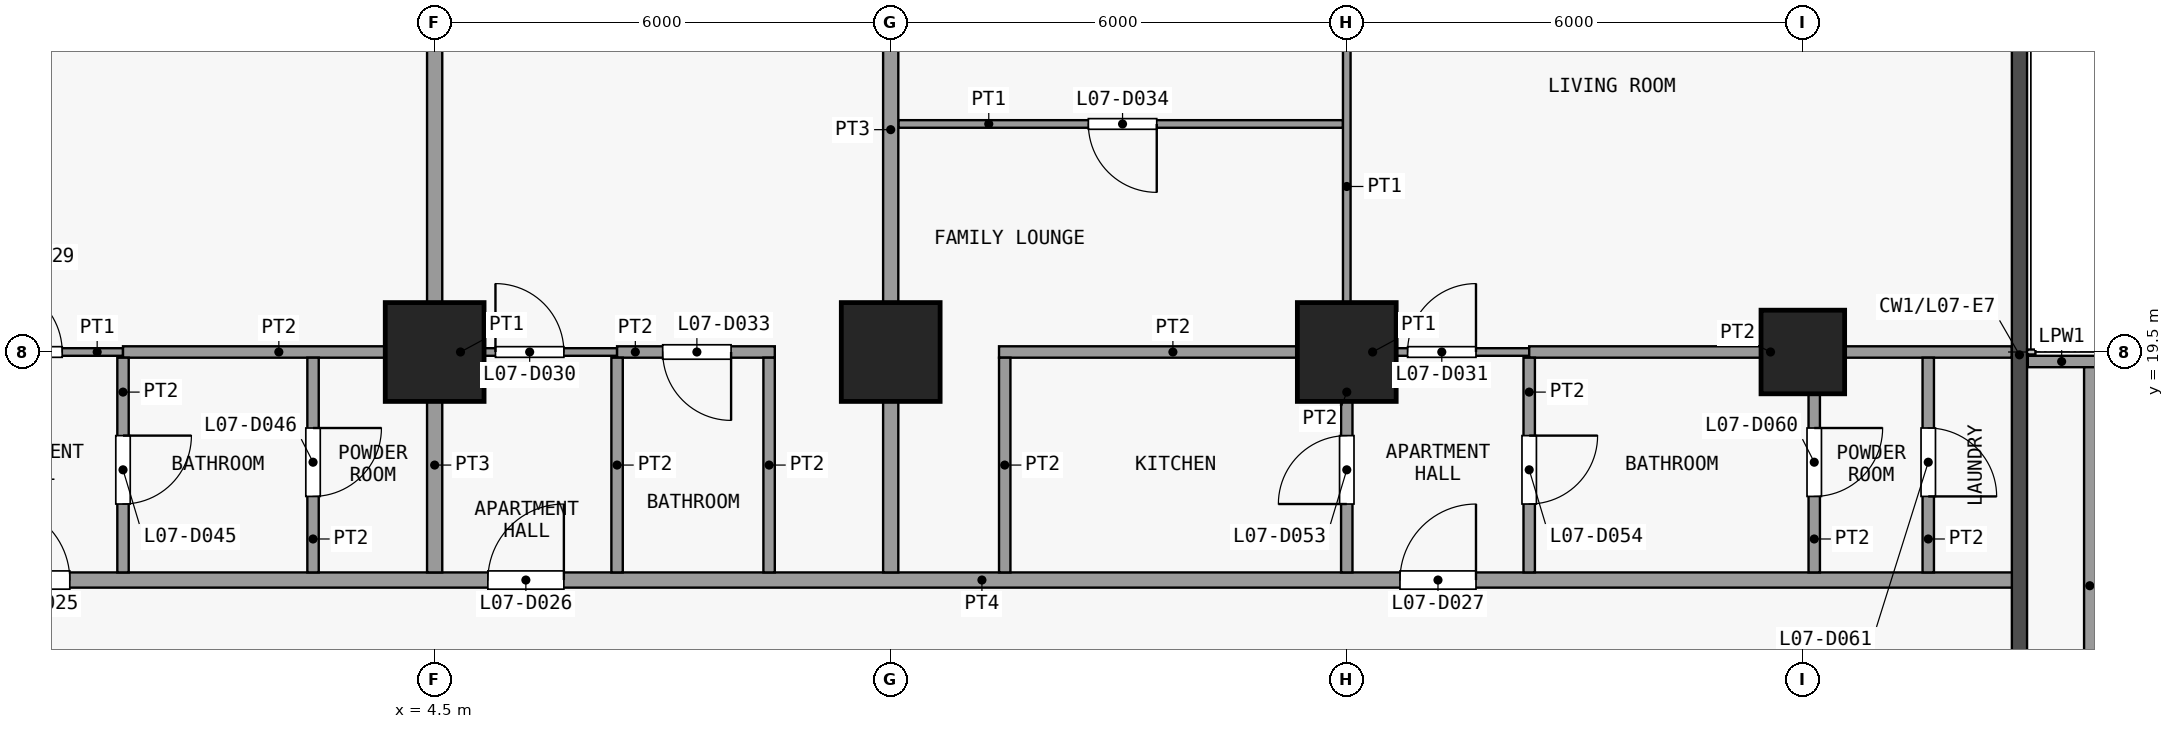
"""IFC4 building model, lengths in metres.
Left out: names, types, materials, properties, quantities, classifications, styles, units other than length and angle.
Written with IfcOpenShell. Run it as: python <this file> out.ifc"""

import sys

from ifc_helpers import new_model, si_unit, direction, frame, frame_2d, origin, origin_2d, place, context, subcontext, project, spatial, rectangle, extrude, element, fill, save


model = new_model("IFC4")
c1 = context("Model", 3, precision=1e-05, world=origin(), true_north=direction((0.0, 1.0)))
c2 = subcontext(c1, "Body", "Model", "MODEL_VIEW")
j1 = project(units=[si_unit("LENGTHUNIT", "METRE"), si_unit("PLANEANGLEUNIT", "RADIAN")], contexts=[c1])
p1 = place(None, origin())
s1 = spatial("IfcSite", under=j1, at=p1, CompositionType="ELEMENT")
p2 = place(p1, origin())
s2 = spatial("IfcBuilding", under=s1, at=p2, CompositionType="ELEMENT")
p3 = place(p2, frame((0.0, 0.0, 36.1)))
s3 = spatial("IfcBuildingStorey", under=s2, at=p3, CompositionType="ELEMENT", Elevation=36.1)
for number, where, z_axis, x_axis in (
    (1, (4.5, 19.5, 0.0), (0.0, 0.0, 1.0), (1.0, 0.0, 0.0)),
    (2, (10.5, 19.5, 0.0), (0.0, 0.0, 1.0), (1.0, 0.0, 0.0)),
    (3, (16.5, 19.5, 0.0), (0.0, 0.0, 1.0), (1.0, 0.0, 0.0)),
):
    element("IfcColumn", number, at=place(p3, frame(where, z_axis=z_axis, x_axis=x_axis)), inside=s3, PredefinedType="COLUMN", context=c2, shape_type="SweptSolid", body=[
        extrude(rectangle(XDim=1.3, YDim=1.3, at=origin_2d()), origin(), (0.0, 0.0, 1.0), 3.6),
    ])
p4 = place(p3, frame((22.5, 19.5, 0.0), z_axis=(0.0, 0.0, 1.0), x_axis=(1.0, 0.0, 0.0)))
e4 = element("IfcColumn", 4, at=p4, inside=s3, PredefinedType="COLUMN", context=c2, shape_type="SweptSolid", body=[
    extrude(rectangle(XDim=1.1, YDim=1.1, at=origin_2d()), origin(), (0.0, 0.0, 1.0), 3.6),
])
p5 = place(p3, frame((25.46, 19.375, 0.0), z_axis=(0.0, 0.0, 1.0), x_axis=(1.0, 0.0, 0.0)))
e5 = element("IfcWall", 5, at=p5, inside=s3, PredefinedType="PARAPET", context=c2, shape_type="SweptSolid", body=[
    extrude(rectangle(XDim=0.89, YDim=0.15, at=frame_2d((0.445, 0.0))), origin(), (0.0, 0.0, 1.0), 1.15),
])
p6 = place(p3, frame((26.275, 19.3, 0.0), z_axis=(0.0, 0.0, 1.0), x_axis=(0.0, -1.0, 0.0)))
e6 = element("IfcWall", 6, at=p6, inside=s3, PredefinedType="PARAPET", context=c2, shape_type="SweptSolid", body=[
    extrude(rectangle(XDim=5.75, YDim=0.15, at=frame_2d((2.875, 0.0))), origin(), (0.0, 0.0, 1.0), 1.15),
])
p7 = place(p3, frame((-26.25, 16.5, 0.0), z_axis=(0.0, 0.0, 1.0), x_axis=(1.0, 0.0, 0.0)))
e7 = element("IfcWall", 7, at=p7, inside=s3, PredefinedType="PARTITIONING", context=c2, shape_type="SweptSolid", body=[
    extrude(rectangle(XDim=51.6, YDim=0.2, at=frame_2d((25.8, 0.0))), origin(), (0.0, 0.0, 1.0), 3.3),
])
p8 = place(p7, frame((5.45, 0.0, 0.0)))
e8 = element("IfcOpeningElement", 8, at=p8, cuts=e7, PredefinedType="OPENING", context=c2, shape_type="SweptSolid", body=[
    extrude(rectangle(XDim=1.0, YDim=2.1, at=frame_2d((0.5, 1.05))), frame((0.0, 0.11, 0.0), z_axis=(0.0, -1.0, 0.0), x_axis=(1.0, 0.0, 0.0)), (0.0, 0.0, 1.0), 0.22),
])
p9 = place(p7, frame((12.25, 0.0, 0.0)))
e9 = element("IfcOpeningElement", 9, at=p9, cuts=e7, PredefinedType="OPENING", context=c2, shape_type="SweptSolid", body=[
    extrude(rectangle(XDim=0.9, YDim=2.1, at=frame_2d((0.45, 1.05))), frame((0.0, 0.11, 0.0), z_axis=(0.0, -1.0, 0.0), x_axis=(1.0, 0.0, 0.0)), (0.0, 0.0, 1.0), 0.22),
])
p10 = place(p7, frame((18.25, 0.0, 0.0)))
e10 = element("IfcOpeningElement", 10, at=p10, cuts=e7, PredefinedType="OPENING", context=c2, shape_type="SweptSolid", body=[
    extrude(rectangle(XDim=0.9, YDim=2.1, at=frame_2d((0.45, 1.05))), frame((0.0, 0.11, 0.0), z_axis=(0.0, -1.0, 0.0), x_axis=(1.0, 0.0, 0.0)), (0.0, 0.0, 1.0), 0.22),
])
p11 = place(p7, frame((24.95, 0.0, 0.0)))
e11 = element("IfcOpeningElement", 11, at=p11, cuts=e7, PredefinedType="OPENING", context=c2, shape_type="SweptSolid", body=[
    extrude(rectangle(XDim=1.0, YDim=2.1, at=frame_2d((0.5, 1.05))), frame((0.0, 0.11, 0.0), z_axis=(0.0, -1.0, 0.0), x_axis=(1.0, 0.0, 0.0)), (0.0, 0.0, 1.0), 0.22),
])
p12 = place(p7, frame((31.45, 0.0, 0.0)))
e12 = element("IfcOpeningElement", 12, at=p12, cuts=e7, PredefinedType="OPENING", context=c2, shape_type="SweptSolid", body=[
    extrude(rectangle(XDim=1.0, YDim=2.1, at=frame_2d((0.5, 1.05))), frame((0.0, 0.11, 0.0), z_axis=(0.0, -1.0, 0.0), x_axis=(1.0, 0.0, 0.0)), (0.0, 0.0, 1.0), 0.22),
])
p13 = place(p7, frame((43.45, 0.0, 0.0)))
e13 = element("IfcOpeningElement", 13, at=p13, cuts=e7, PredefinedType="OPENING", context=c2, shape_type="SweptSolid", body=[
    extrude(rectangle(XDim=1.0, YDim=2.1, at=frame_2d((0.5, 1.05))), frame((0.0, 0.11, 0.0), z_axis=(0.0, -1.0, 0.0), x_axis=(1.0, 0.0, 0.0)), (0.0, 0.0, 1.0), 0.22),
])
p14 = place(p3, frame((-2.0, 19.5, 0.0), z_axis=(0.0, 0.0, 1.0), x_axis=(1.0, 0.0, 0.0)))
e14 = element("IfcWall", 14, at=p14, inside=s3, PredefinedType="PARTITIONING", context=c2, shape_type="SweptSolid", body=[
    extrude(rectangle(XDim=2.4, YDim=0.1, at=frame_2d((1.2, 0.0))), origin(), (0.0, 0.0, 1.0), 3.3),
])
p15 = place(p14, frame((0.7, 0.0, 0.0)))
e15 = element("IfcOpeningElement", 15, at=p15, cuts=e14, PredefinedType="OPENING", context=c2, shape_type="SweptSolid", body=[
    extrude(rectangle(XDim=0.9, YDim=2.1, at=frame_2d((0.45, 1.05))), frame((0.0, 0.06, 0.0), z_axis=(0.0, -1.0, 0.0), x_axis=(1.0, 0.0, 0.0)), (0.0, 0.0, 1.0), 0.12),
])
p16 = place(p3, frame((4.5, 19.5, 0.0), z_axis=(0.0, 0.0, 1.0), x_axis=(1.0, 0.0, 0.0)))
e16 = element("IfcWall", 16, at=p16, inside=s3, PredefinedType="PARTITIONING", context=c2, shape_type="SweptSolid", body=[
    extrude(rectangle(XDim=2.4, YDim=0.1, at=frame_2d((1.2, 0.0))), origin(), (0.0, 0.0, 1.0), 3.3),
])
p17 = place(p16, frame((0.8, 0.0, 0.0)))
e17 = element("IfcOpeningElement", 17, at=p17, cuts=e16, PredefinedType="OPENING", context=c2, shape_type="SweptSolid", body=[
    extrude(rectangle(XDim=0.9, YDim=2.1, at=frame_2d((0.45, 1.05))), frame((0.0, 0.06, 0.0), z_axis=(0.0, -1.0, 0.0), x_axis=(1.0, 0.0, 0.0)), (0.0, 0.0, 1.0), 0.12),
])
p18 = place(p3, frame((16.5, 19.5, 0.0), z_axis=(0.0, 0.0, 1.0), x_axis=(1.0, 0.0, 0.0)))
e18 = element("IfcWall", 18, at=p18, inside=s3, PredefinedType="PARTITIONING", context=c2, shape_type="SweptSolid", body=[
    extrude(rectangle(XDim=2.4, YDim=0.1, at=frame_2d((1.2, 0.0))), origin(), (0.0, 0.0, 1.0), 3.3),
])
p19 = place(p18, frame((0.8, 0.0, 0.0)))
e19 = element("IfcOpeningElement", 19, at=p19, cuts=e18, PredefinedType="OPENING", context=c2, shape_type="SweptSolid", body=[
    extrude(rectangle(XDim=0.9, YDim=2.1, at=frame_2d((0.45, 1.05))), frame((0.0, 0.06, 0.0), z_axis=(0.0, -1.0, 0.0), x_axis=(1.0, 0.0, 0.0)), (0.0, 0.0, 1.0), 0.12),
])
p20 = place(p3, frame((0.4, 19.5, 0.0), z_axis=(0.0, 0.0, 1.0), x_axis=(1.0, 0.0, 0.0)))
e20 = element("IfcWall", 20, at=p20, inside=s3, PredefinedType="PARTITIONING", context=c2, shape_type="SweptSolid", body=[
    extrude(rectangle(XDim=4.1, YDim=0.15, at=frame_2d((2.05, 0.0))), origin(), (0.0, 0.0, 1.0), 3.3),
])
p21 = place(p3, frame((6.9, 19.5, 0.0), z_axis=(0.0, 0.0, 1.0), x_axis=(1.0, 0.0, 0.0)))
e21 = element("IfcWall", 21, at=p21, inside=s3, PredefinedType="PARTITIONING", context=c2, shape_type="SweptSolid", body=[
    extrude(rectangle(XDim=2.075, YDim=0.15, at=frame_2d((1.038, 0.0))), origin(), (0.0, 0.0, 1.0), 3.3),
])
p22 = place(p21, frame((0.6, 0.0, 0.0)))
e22 = element("IfcOpeningElement", 22, at=p22, cuts=e21, PredefinedType="OPENING", context=c2, shape_type="SweptSolid", body=[
    extrude(rectangle(XDim=0.9, YDim=2.1, at=frame_2d((0.45, 1.05))), frame((0.0, 0.085, 0.0), z_axis=(0.0, -1.0, 0.0), x_axis=(1.0, 0.0, 0.0)), (0.0, 0.0, 1.0), 0.17),
])
p23 = place(p3, frame((11.925, 19.5, 0.0), z_axis=(0.0, 0.0, 1.0), x_axis=(1.0, 0.0, 0.0)))
e23 = element("IfcWall", 23, at=p23, inside=s3, PredefinedType="PARTITIONING", context=c2, shape_type="SweptSolid", body=[
    extrude(rectangle(XDim=4.575, YDim=0.15, at=frame_2d((2.288, 0.0))), origin(), (0.0, 0.0, 1.0), 3.3),
])
p24 = place(p3, frame((18.9, 19.5, 0.0), z_axis=(0.0, 0.0, 1.0), x_axis=(1.0, 0.0, 0.0)))
e24 = element("IfcWall", 24, at=p24, inside=s3, PredefinedType="PARTITIONING", context=c2, shape_type="SweptSolid", body=[
    extrude(rectangle(XDim=6.35, YDim=0.15, at=frame_2d((3.175, 0.0))), origin(), (0.0, 0.0, 1.0), 3.3),
])
p25 = place(p3, frame((10.6, 22.5, 0.0), z_axis=(0.0, 0.0, 1.0), x_axis=(1.0, 0.0, 0.0)))
e25 = element("IfcWall", 25, at=p25, inside=s3, PredefinedType="PARTITIONING", context=c2, shape_type="SweptSolid", body=[
    extrude(rectangle(XDim=5.85, YDim=0.1, at=frame_2d((2.925, 0.0))), origin(), (0.0, 0.0, 1.0), 3.3),
])
p26 = place(p25, frame((2.5, 0.0, 0.0)))
e26 = element("IfcOpeningElement", 26, at=p26, cuts=e25, PredefinedType="OPENING", context=c2, shape_type="SweptSolid", body=[
    extrude(rectangle(XDim=0.9, YDim=2.1, at=frame_2d((0.45, 1.05))), frame((0.0, 0.06, 0.0), z_axis=(0.0, -1.0, 0.0), x_axis=(1.0, 0.0, 0.0)), (0.0, 0.0, 1.0), 0.12),
])
p27 = place(p3, frame((0.4, 16.6, 0.0), z_axis=(0.0, 0.0, 1.0), x_axis=(0.0, 1.0, 0.0)))
e27 = element("IfcWall", 27, at=p27, inside=s3, PredefinedType="PARTITIONING", context=c2, shape_type="SweptSolid", body=[
    extrude(rectangle(XDim=2.825, YDim=0.15, at=frame_2d((1.413, 0.0))), origin(), (0.0, 0.0, 1.0), 3.3),
])
p28 = place(p27, frame((0.9, 0.0, 0.0)))
e28 = element("IfcOpeningElement", 28, at=p28, cuts=e27, PredefinedType="OPENING", context=c2, shape_type="SweptSolid", body=[
    extrude(rectangle(XDim=0.9, YDim=2.1, at=frame_2d((0.45, 1.05))), frame((0.0, 0.085, 0.0), z_axis=(0.0, -1.0, 0.0), x_axis=(1.0, 0.0, 0.0)), (0.0, 0.0, 1.0), 0.17),
])
p29 = place(p3, frame((2.9, 16.6, 0.0), z_axis=(0.0, 0.0, 1.0), x_axis=(0.0, 1.0, 0.0)))
e29 = element("IfcWall", 29, at=p29, inside=s3, PredefinedType="PARTITIONING", context=c2, shape_type="SweptSolid", body=[
    extrude(rectangle(XDim=2.825, YDim=0.15, at=frame_2d((1.413, 0.0))), origin(), (0.0, 0.0, 1.0), 3.3),
])
p30 = place(p29, frame((1.0, 0.0, 0.0)))
e30 = element("IfcOpeningElement", 30, at=p30, cuts=e29, PredefinedType="OPENING", context=c2, shape_type="SweptSolid", body=[
    extrude(rectangle(XDim=0.9, YDim=2.1, at=frame_2d((0.45, 1.05))), frame((0.0, 0.085, 0.0), z_axis=(0.0, -1.0, 0.0), x_axis=(1.0, 0.0, 0.0)), (0.0, 0.0, 1.0), 0.17),
])
p31 = place(p3, frame((4.5, 16.6, 0.0), z_axis=(0.0, 0.0, 1.0), x_axis=(0.0, 1.0, 0.0)))
e31 = element("IfcWall", 31, at=p31, inside=s3, PredefinedType="PARTITIONING", context=c2, shape_type="SweptSolid", body=[
    extrude(rectangle(XDim=2.825, YDim=0.2, at=frame_2d((1.413, 0.0))), origin(), (0.0, 0.0, 1.0), 3.3),
])
p32 = place(p3, frame((4.5, 19.575, 0.0), z_axis=(0.0, 0.0, 1.0), x_axis=(0.0, 1.0, 0.0)))
e32 = element("IfcWall", 32, at=p32, inside=s3, PredefinedType="PARTITIONING", context=c2, shape_type="SweptSolid", body=[
    extrude(rectangle(XDim=8.675, YDim=0.2, at=frame_2d((4.337, 0.0))), origin(), (0.0, 0.0, 1.0), 3.3),
])
for number, where, z_axis, x_axis in (
    (33, (6.9, 16.6, 0.0), (0.0, 0.0, 1.0), (0.0, 1.0, 0.0)),
    (34, (8.9, 16.6, 0.0), (0.0, 0.0, 1.0), (0.0, 1.0, 0.0)),
):
    element("IfcWall", number, at=place(p3, frame(where, z_axis=z_axis, x_axis=x_axis)), inside=s3, PredefinedType="PARTITIONING", context=c2, shape_type="SweptSolid", body=[
        extrude(rectangle(XDim=2.825, YDim=0.15, at=frame_2d((1.413, 0.0))), origin(), (0.0, 0.0, 1.0), 3.3),
    ])
p33 = place(p3, frame((10.5, 16.6, 0.0), z_axis=(0.0, 0.0, 1.0), x_axis=(0.0, 1.0, 0.0)))
e35 = element("IfcWall", 35, at=p33, inside=s3, PredefinedType="PARTITIONING", context=c2, shape_type="SweptSolid", body=[
    extrude(rectangle(XDim=11.65, YDim=0.2, at=frame_2d((5.825, 0.0))), origin(), (0.0, 0.0, 1.0), 3.3),
])
p34 = place(p3, frame((12.0, 16.6, 0.0), z_axis=(0.0, 0.0, 1.0), x_axis=(0.0, 1.0, 0.0)))
e36 = element("IfcWall", 36, at=p34, inside=s3, PredefinedType="PARTITIONING", context=c2, shape_type="SweptSolid", body=[
    extrude(rectangle(XDim=2.825, YDim=0.15, at=frame_2d((1.413, 0.0))), origin(), (0.0, 0.0, 1.0), 3.3),
])
p35 = place(p3, frame((16.5, 19.575, 0.0), z_axis=(0.0, 0.0, 1.0), x_axis=(0.0, 1.0, 0.0)))
e37 = element("IfcWall", 37, at=p35, inside=s3, PredefinedType="PARTITIONING", context=c2, shape_type="SweptSolid", body=[
    extrude(rectangle(XDim=8.675, YDim=0.1, at=frame_2d((4.337, 0.0))), origin(), (0.0, 0.0, 1.0), 3.3),
])
p36 = place(p35, frame((4.325, 0.0, 0.0)))
e38 = element("IfcOpeningElement", 38, at=p36, cuts=e37, PredefinedType="OPENING", context=c2, shape_type="SweptSolid", body=[
    extrude(rectangle(XDim=0.9, YDim=2.1, at=frame_2d((0.45, 1.05))), frame((0.0, 0.06, 0.0), z_axis=(0.0, -1.0, 0.0), x_axis=(1.0, 0.0, 0.0)), (0.0, 0.0, 1.0), 0.12),
])
p37 = place(p3, frame((16.5, 16.6, 0.0), z_axis=(0.0, 0.0, 1.0), x_axis=(0.0, 1.0, 0.0)))
e39 = element("IfcWall", 39, at=p37, inside=s3, PredefinedType="PARTITIONING", context=c2, shape_type="SweptSolid", body=[
    extrude(rectangle(XDim=2.825, YDim=0.15, at=frame_2d((1.413, 0.0))), origin(), (0.0, 0.0, 1.0), 3.3),
])
p38 = place(p37, frame((0.9, 0.0, 0.0)))
e40 = element("IfcOpeningElement", 40, at=p38, cuts=e39, PredefinedType="OPENING", context=c2, shape_type="SweptSolid", body=[
    extrude(rectangle(XDim=0.9, YDim=2.1, at=frame_2d((0.45, 1.05))), frame((0.0, 0.085, 0.0), z_axis=(0.0, -1.0, 0.0), x_axis=(1.0, 0.0, 0.0)), (0.0, 0.0, 1.0), 0.17),
])
p39 = place(p3, frame((18.9, 16.6, 0.0), z_axis=(0.0, 0.0, 1.0), x_axis=(0.0, 1.0, 0.0)))
e41 = element("IfcWall", 41, at=p39, inside=s3, PredefinedType="PARTITIONING", context=c2, shape_type="SweptSolid", body=[
    extrude(rectangle(XDim=2.825, YDim=0.15, at=frame_2d((1.413, 0.0))), origin(), (0.0, 0.0, 1.0), 3.3),
])
p40 = place(p39, frame((0.9, 0.0, 0.0)))
e42 = element("IfcOpeningElement", 42, at=p40, cuts=e41, PredefinedType="OPENING", context=c2, shape_type="SweptSolid", body=[
    extrude(rectangle(XDim=0.9, YDim=2.1, at=frame_2d((0.45, 1.05))), frame((0.0, 0.085, 0.0), z_axis=(0.0, -1.0, 0.0), x_axis=(1.0, 0.0, 0.0)), (0.0, 0.0, 1.0), 0.17),
])
p41 = place(p3, frame((22.65, 16.6, 0.0), z_axis=(0.0, 0.0, 1.0), x_axis=(0.0, 1.0, 0.0)))
e43 = element("IfcWall", 43, at=p41, inside=s3, PredefinedType="PARTITIONING", context=c2, shape_type="SweptSolid", body=[
    extrude(rectangle(XDim=2.825, YDim=0.15, at=frame_2d((1.413, 0.0))), origin(), (0.0, 0.0, 1.0), 3.3),
])
p42 = place(p41, frame((1.0, 0.0, 0.0)))
e44 = element("IfcOpeningElement", 44, at=p42, cuts=e43, PredefinedType="OPENING", context=c2, shape_type="SweptSolid", body=[
    extrude(rectangle(XDim=0.9, YDim=2.1, at=frame_2d((0.45, 1.05))), frame((0.0, 0.085, 0.0), z_axis=(0.0, -1.0, 0.0), x_axis=(1.0, 0.0, 0.0)), (0.0, 0.0, 1.0), 0.17),
])
p43 = place(p3, frame((24.15, 16.6, 0.0), z_axis=(0.0, 0.0, 1.0), x_axis=(0.0, 1.0, 0.0)))
e45 = element("IfcWall", 45, at=p43, inside=s3, PredefinedType="PARTITIONING", context=c2, shape_type="SweptSolid", body=[
    extrude(rectangle(XDim=2.825, YDim=0.15, at=frame_2d((1.413, 0.0))), origin(), (0.0, 0.0, 1.0), 3.3),
])
p44 = place(p43, frame((1.0, 0.0, 0.0)))
e46 = element("IfcOpeningElement", 46, at=p44, cuts=e45, PredefinedType="OPENING", context=c2, shape_type="SweptSolid", body=[
    extrude(rectangle(XDim=0.9, YDim=2.1, at=frame_2d((0.45, 1.05))), frame((0.0, 0.085, 0.0), z_axis=(0.0, -1.0, 0.0), x_axis=(1.0, 0.0, 0.0)), (0.0, 0.0, 1.0), 0.17),
])
p45 = place(p11, origin())
e47 = element("IfcDoor", 47, at=p45, inside=s3, OperationType="SINGLE_SWING_RIGHT", PredefinedType="DOOR", context=c2, shape_type="SweptSolid", body=[
    extrude(rectangle(XDim=1.0, YDim=2.1, at=frame_2d((0.5, 1.05))), frame((0.0, 0.025, 0.0), z_axis=(0.0, -1.0, 0.0), x_axis=(1.0, 0.0, 0.0)), (0.0, 0.0, 1.0), 0.05),
])
fill(e11, e47)
p46 = place(p12, origin())
e48 = element("IfcDoor", 48, at=p46, inside=s3, OperationType="SINGLE_SWING_LEFT", PredefinedType="DOOR", context=c2, shape_type="SweptSolid", body=[
    extrude(rectangle(XDim=1.0, YDim=2.1, at=frame_2d((0.5, 1.05))), frame((0.0, 0.025, 0.0), z_axis=(0.0, -1.0, 0.0), x_axis=(1.0, 0.0, 0.0)), (0.0, 0.0, 1.0), 0.05),
])
fill(e12, e48)
p47 = place(p13, origin())
e49 = element("IfcDoor", 49, at=p47, inside=s3, OperationType="SINGLE_SWING_LEFT", PredefinedType="DOOR", context=c2, shape_type="SweptSolid", body=[
    extrude(rectangle(XDim=1.0, YDim=2.1, at=frame_2d((0.5, 1.05))), frame((0.0, 0.025, 0.0), z_axis=(0.0, -1.0, 0.0), x_axis=(1.0, 0.0, 0.0)), (0.0, 0.0, 1.0), 0.05),
])
fill(e13, e49)
p48 = place(p15, origin())
e50 = element("IfcDoor", 50, at=p48, inside=s3, OperationType="SINGLE_SWING_RIGHT", PredefinedType="DOOR", context=c2, shape_type="SweptSolid", body=[
    extrude(rectangle(XDim=0.9, YDim=2.1, at=frame_2d((0.45, 1.05))), frame((0.0, 0.025, 0.0), z_axis=(0.0, -1.0, 0.0), x_axis=(1.0, 0.0, 0.0)), (0.0, 0.0, 1.0), 0.05),
])
fill(e15, e50)
p49 = place(p17, origin())
e51 = element("IfcDoor", 51, at=p49, inside=s3, OperationType="SINGLE_SWING_RIGHT", PredefinedType="DOOR", context=c2, shape_type="SweptSolid", body=[
    extrude(rectangle(XDim=0.9, YDim=2.1, at=frame_2d((0.45, 1.05))), frame((0.0, 0.025, 0.0), z_axis=(0.0, -1.0, 0.0), x_axis=(1.0, 0.0, 0.0)), (0.0, 0.0, 1.0), 0.05),
])
fill(e17, e51)
p50 = place(p19, origin())
e52 = element("IfcDoor", 52, at=p50, inside=s3, OperationType="SINGLE_SWING_LEFT", PredefinedType="DOOR", context=c2, shape_type="SweptSolid", body=[
    extrude(rectangle(XDim=0.9, YDim=2.1, at=frame_2d((0.45, 1.05))), frame((0.0, 0.025, 0.0), z_axis=(0.0, -1.0, 0.0), x_axis=(1.0, 0.0, 0.0)), (0.0, 0.0, 1.0), 0.05),
])
fill(e19, e52)
p51 = place(p22, origin())
e53 = element("IfcDoor", 53, at=p51, inside=s3, OperationType="SINGLE_SWING_RIGHT", PredefinedType="DOOR", context=c2, shape_type="SweptSolid", body=[
    extrude(rectangle(XDim=0.9, YDim=2.1, at=frame_2d((0.45, 1.05))), frame((0.0, 0.025, 0.0), z_axis=(0.0, -1.0, 0.0), x_axis=(1.0, 0.0, 0.0)), (0.0, 0.0, 1.0), 0.05),
])
fill(e22, e53)
p52 = place(p26, origin())
e54 = element("IfcDoor", 54, at=p52, inside=s3, OperationType="SINGLE_SWING_RIGHT", PredefinedType="DOOR", context=c2, shape_type="SweptSolid", body=[
    extrude(rectangle(XDim=0.9, YDim=2.1, at=frame_2d((0.45, 1.05))), frame((0.0, 0.025, 0.0), z_axis=(0.0, -1.0, 0.0), x_axis=(1.0, 0.0, 0.0)), (0.0, 0.0, 1.0), 0.05),
])
fill(e26, e54)
p53 = place(p28, origin())
e55 = element("IfcDoor", 55, at=p53, inside=s3, OperationType="SINGLE_SWING_RIGHT", PredefinedType="DOOR", context=c2, shape_type="SweptSolid", body=[
    extrude(rectangle(XDim=0.9, YDim=2.1, at=frame_2d((0.45, 1.05))), frame((0.0, 0.025, 0.0), z_axis=(0.0, -1.0, 0.0), x_axis=(1.0, 0.0, 0.0)), (0.0, 0.0, 1.0), 0.05),
])
fill(e28, e55)
p54 = place(p30, origin())
e56 = element("IfcDoor", 56, at=p54, inside=s3, OperationType="SINGLE_SWING_RIGHT", PredefinedType="DOOR", context=c2, shape_type="SweptSolid", body=[
    extrude(rectangle(XDim=0.9, YDim=2.1, at=frame_2d((0.45, 1.05))), frame((0.0, 0.025, 0.0), z_axis=(0.0, -1.0, 0.0), x_axis=(1.0, 0.0, 0.0)), (0.0, 0.0, 1.0), 0.05),
])
fill(e30, e56)
p55 = place(p38, origin())
e57 = element("IfcDoor", 57, at=p55, inside=s3, OperationType="SINGLE_SWING_RIGHT", PredefinedType="DOOR", context=c2, shape_type="SweptSolid", body=[
    extrude(rectangle(XDim=0.9, YDim=2.1, at=frame_2d((0.45, 1.05))), frame((0.0, 0.025, 0.0), z_axis=(0.0, -1.0, 0.0), x_axis=(1.0, 0.0, 0.0)), (0.0, 0.0, 1.0), 0.05),
])
fill(e40, e57)
p56 = place(p40, origin())
e58 = element("IfcDoor", 58, at=p56, inside=s3, OperationType="SINGLE_SWING_RIGHT", PredefinedType="DOOR", context=c2, shape_type="SweptSolid", body=[
    extrude(rectangle(XDim=0.9, YDim=2.1, at=frame_2d((0.45, 1.05))), frame((0.0, 0.025, 0.0), z_axis=(0.0, -1.0, 0.0), x_axis=(1.0, 0.0, 0.0)), (0.0, 0.0, 1.0), 0.05),
])
fill(e42, e58)
p57 = place(p42, origin())
e59 = element("IfcDoor", 59, at=p57, inside=s3, OperationType="SINGLE_SWING_RIGHT", PredefinedType="DOOR", context=c2, shape_type="SweptSolid", body=[
    extrude(rectangle(XDim=0.9, YDim=2.1, at=frame_2d((0.45, 1.05))), frame((0.0, 0.025, 0.0), z_axis=(0.0, -1.0, 0.0), x_axis=(1.0, 0.0, 0.0)), (0.0, 0.0, 1.0), 0.05),
])
fill(e44, e59)
p58 = place(p44, origin())
e60 = element("IfcDoor", 60, at=p58, inside=s3, OperationType="SINGLE_SWING_LEFT", PredefinedType="DOOR", context=c2, shape_type="SweptSolid", body=[
    extrude(rectangle(XDim=0.9, YDim=2.1, at=frame_2d((0.45, 1.05))), frame((0.0, 0.025, 0.0), z_axis=(0.0, -1.0, 0.0), x_axis=(1.0, 0.0, 0.0)), (0.0, 0.0, 1.0), 0.05),
])
fill(e46, e60)
save(model, sys.argv[1])
